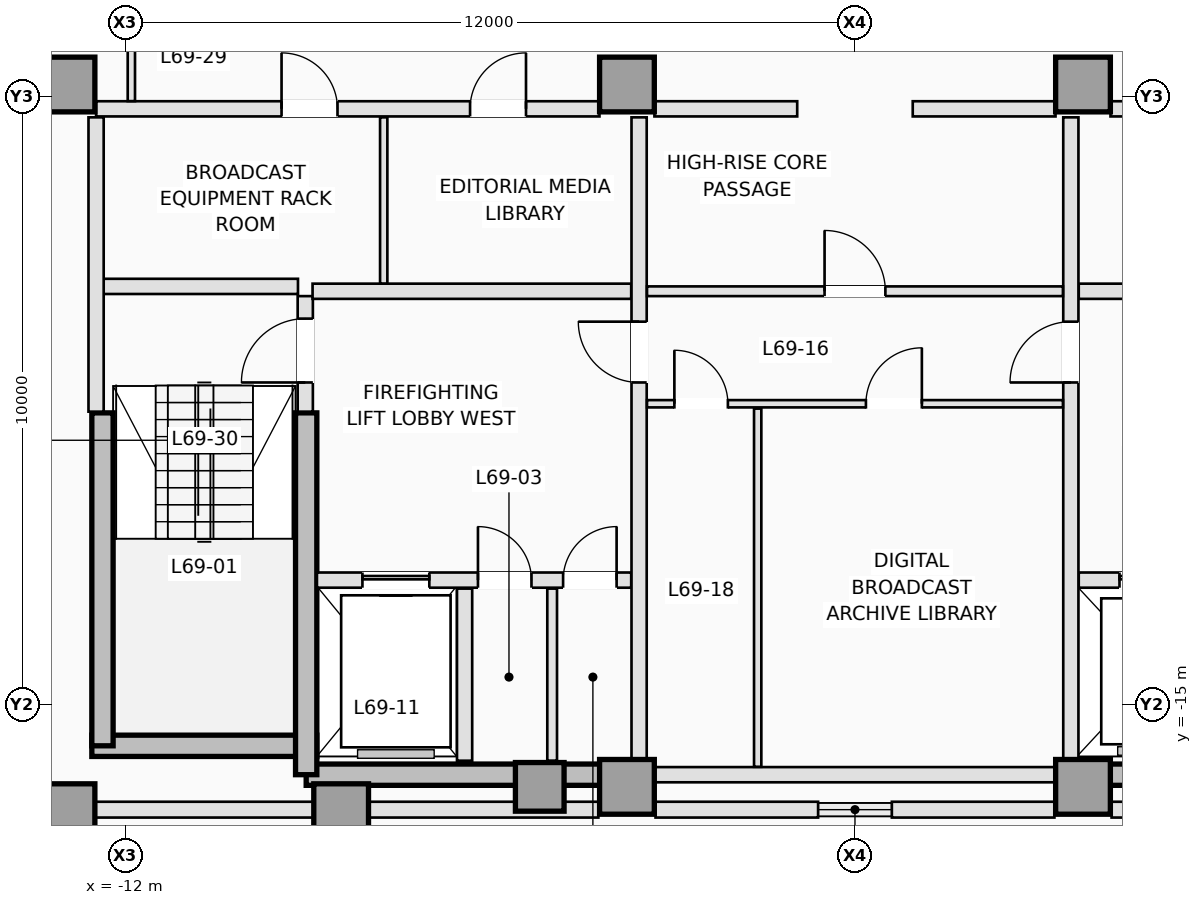
"""IFC4 building model, lengths in metres.
Left out: names, types, materials, properties, quantities, classifications, styles, units other than length and angle.
Written with IfcOpenShell. Run it as: python <this file> out.ifc"""

import sys

from ifc_helpers import new_model, si_unit, direction, frame, frame_2d, origin, origin_2d, place, context, subcontext, project, spatial, rectangle, extrude, element, fill, save


model = new_model("IFC4")
c1 = context("Model", 3, precision=1e-05, world=origin(), true_north=direction((0.0, 1.0)))
c2 = subcontext(c1, "Body", "Model", "MODEL_VIEW")
j1 = project(units=[si_unit("LENGTHUNIT", "METRE"), si_unit("PLANEANGLEUNIT", "RADIAN")], contexts=[c1])
p1 = place(None, origin())
s1 = spatial("IfcSite", under=j1, at=p1, CompositionType="ELEMENT")
p2 = place(p1, origin())
s2 = spatial("IfcBuilding", under=s1, at=p2, CompositionType="ELEMENT")
p3 = place(p2, frame((0.0, 0.0, 249.9)))
s3 = spatial("IfcBuildingStorey", under=s2, at=p3, CompositionType="ELEMENT", Elevation=249.9)
p4 = place(p3, frame((-12.55, -15.675, 0.0), z_axis=(0.0, 0.0, 1.0), x_axis=(1.0, 0.0, 0.0)))
e1 = element("IfcWall", 1, at=p4, inside=s3, PredefinedType="SHEAR", context=c2, shape_type="SweptSolid", body=[
    extrude(rectangle(XDim=3.7, YDim=0.35, at=frame_2d((1.85, 0.0))), origin(), (0.0, 0.0, 1.0), 3.5),
])
for number, where, z_axis, x_axis in (
    (2, (-9.025, -16.15, 0.0), (0.0, 0.0, 1.0), (1.0, 0.0, 0.0)),
    (3, (3.75, -16.15, 0.0), (0.0, 0.0, 1.0), (1.0, 0.0, 0.0)),
):
    element("IfcWall", number, at=place(p3, frame(where, z_axis=z_axis, x_axis=x_axis)), inside=s3, PredefinedType="SHEAR", context=c2, shape_type="SweptSolid", body=[
        extrude(rectangle(XDim=5.275, YDim=0.35, at=frame_2d((2.637, 0.0))), origin(), (0.0, 0.0, 1.0), 3.5),
    ])
p5 = place(p3, frame((-12.375, -15.675, 0.0), z_axis=(0.0, 0.0, 1.0), x_axis=(0.0, 1.0, 0.0)))
e4 = element("IfcWall", 4, at=p5, inside=s3, PredefinedType="SHEAR", context=c2, shape_type="SweptSolid", body=[
    extrude(rectangle(XDim=5.475, YDim=0.35, at=frame_2d((2.738, 0.0))), origin(), (0.0, 0.0, 1.0), 3.5),
])
p6 = place(p3, frame((-9.025, -16.15, 0.0), z_axis=(0.0, 0.0, 1.0), x_axis=(0.0, 1.0, 0.0)))
e5 = element("IfcWall", 5, at=p6, inside=s3, PredefinedType="SHEAR", context=c2, shape_type="SweptSolid", body=[
    extrude(rectangle(XDim=5.95, YDim=0.35, at=frame_2d((2.975, 0.0))), origin(), (0.0, 0.0, 1.0), 3.5),
])
for number, where, z_axis, x_axis in (
    (6, (-12.95, -16.75, 0.0), (0.0, 0.0, 1.0), (1.0, 0.0, 0.0)),
    (7, (-8.45, -16.75, 0.0), (0.0, 0.0, 1.0), (1.0, 0.0, 0.0)),
    (8, (-3.75, -16.35, 0.0), (0.0, 0.0, 1.0), (1.0, 0.0, 0.0)),
    (9, (3.75, -16.35, 0.0), (0.0, 0.0, 1.0), (1.0, 0.0, 0.0)),
    (10, (-12.95, -4.8, 0.0), (0.0, 0.0, 1.0), (1.0, 0.0, 0.0)),
    (11, (-3.75, -4.8, 0.0), (0.0, 0.0, 1.0), (1.0, 0.0, 0.0)),
    (12, (3.75, -4.8, 0.0), (0.0, 0.0, 1.0), (1.0, 0.0, 0.0)),
):
    element("IfcColumn", number, at=place(p3, frame(where, z_axis=z_axis, x_axis=x_axis)), inside=s3, PredefinedType="COLUMN", context=c2, shape_type="SweptSolid", body=[
        extrude(rectangle(XDim=0.9, YDim=0.9, at=origin_2d()), origin(), (0.0, 0.0, 1.0), 3.5),
    ])
p7 = place(p3, frame((-5.184, -16.35, 0.0), z_axis=(0.0, 0.0, 1.0), x_axis=(0.0, 1.0, 0.0)))
e13 = element("IfcColumn", 13, at=p7, inside=s3, PredefinedType="COLUMN", context=c2, shape_type="SweptSolid", body=[
    extrude(rectangle(XDim=0.8, YDim=0.8, at=origin_2d()), origin(), (0.0, 0.0, 1.0), 3.5),
])
for number, where, z_axis, x_axis in (
    (14, (15.493, -16.725, 0.0), (0.0, 0.0, 1.0), (-1.0, 0.0, 0.0)),
    (15, (-4.22, -16.725, 0.0), (0.0, 0.0, 1.0), (-1.0, 0.0, 0.0)),
):
    element("IfcWall", number, at=place(p3, frame(where, z_axis=z_axis, x_axis=x_axis)), inside=s3, PredefinedType="STANDARD", context=c2, shape_type="SweptSolid", body=[
        extrude(rectangle(XDim=11.273, YDim=0.26, at=frame_2d((5.636, 0.0))), origin(), (0.0, 0.0, 1.0), 2.79),
    ])
for number, where, z_axis, x_axis in (
    (16, (3.28, -16.725, 0.0), (0.0, 0.0, 1.0), (-1.0, 0.0, 0.0)),
    (17, (-0.606, -16.725, 0.0), (0.0, 0.0, 1.0), (-1.0, 0.0, 0.0)),
):
    element("IfcWall", number, at=place(p3, frame(where, z_axis=z_axis, x_axis=x_axis)), inside=s3, PredefinedType="STANDARD", context=c2, shape_type="SweptSolid", body=[
        extrude(rectangle(XDim=2.674, YDim=0.26, at=frame_2d((1.337, 0.0))), origin(), (0.0, 0.0, 1.0), 3.25),
    ])
p8 = place(p3, frame((-9.04, -10.18, 0.0), z_axis=(0.0, 0.0, 1.0), x_axis=(0.0, 1.0, 0.0)))
e18 = element("IfcWall", 18, at=p8, inside=s3, PredefinedType="PARTITIONING", context=c2, shape_type="SweptSolid", body=[
    extrude(rectangle(XDim=1.9, YDim=0.25, at=frame_2d((0.95, 0.0))), origin(), (0.0, 0.0, 1.0), 3.25),
])
p9 = place(p8, frame((0.48, 0.0, 0.0)))
e19 = element("IfcOpeningElement", 19, at=p9, cuts=e18, PredefinedType="OPENING", context=c2, shape_type="SweptSolid", body=[
    extrude(rectangle(XDim=1.05, YDim=2.15, at=frame_2d((0.525, 1.075))), frame((0.0, 0.135, 0.0), z_axis=(0.0, -1.0, 0.0), x_axis=(1.0, 0.0, 0.0)), (0.0, 0.0, 1.0), 0.27),
])
p10 = place(p3, frame((-12.38, -8.12, 0.0), z_axis=(0.0, 0.0, 1.0), x_axis=(1.0, 0.0, 0.0)))
e20 = element("IfcWall", 20, at=p10, inside=s3, PredefinedType="PARTITIONING", context=c2, shape_type="SweptSolid", body=[
    extrude(rectangle(XDim=3.22, YDim=0.25, at=frame_2d((1.61, 0.0))), origin(), (0.0, 0.0, 1.0), 3.25),
])
p11 = place(p3, frame((-12.48, -10.18, 0.0), z_axis=(0.0, 0.0, 1.0), x_axis=(0.0, 1.0, 0.0)))
e21 = element("IfcWall", 21, at=p11, inside=s3, PredefinedType="PARTITIONING", context=c2, shape_type="SweptSolid", body=[
    extrude(rectangle(XDim=4.84, YDim=0.25, at=frame_2d((2.42, 0.0))), origin(), (0.0, 0.0, 1.0), 3.25),
])
p12 = place(p3, frame((-8.848, -12.95, 0.0), z_axis=(0.0, 0.0, 1.0), x_axis=(1.0, 0.0, 0.0)))
e22 = element("IfcWall", 22, at=p12, inside=s3, PredefinedType="PARTITIONING", context=c2, shape_type="SweptSolid", body=[
    extrude(rectangle(XDim=5.168, YDim=0.25, at=frame_2d((2.584, 0.0))), origin(), (0.0, 0.0, 1.0), 3.25),
])
p13 = place(p12, frame((0.748, 0.0, 0.0)))
e23 = element("IfcOpeningElement", 23, at=p13, cuts=e22, PredefinedType="OPENING", context=c2, shape_type="SweptSolid", body=[
    extrude(rectangle(XDim=1.1, YDim=2.15, at=frame_2d((0.55, 1.075))), frame((0.0, 0.135, 0.0), z_axis=(0.0, -1.0, 0.0), x_axis=(1.0, 0.0, 0.0)), (0.0, 0.0, 1.0), 0.27),
])
p14 = place(p12, frame((2.648, 0.0, 0.0)))
e24 = element("IfcOpeningElement", 24, at=p14, cuts=e22, PredefinedType="OPENING", context=c2, shape_type="SweptSolid", body=[
    extrude(rectangle(XDim=0.88, YDim=2.1, at=frame_2d((0.44, 1.05))), frame((0.0, 0.135, 0.0), z_axis=(0.0, -1.0, 0.0), x_axis=(1.0, 0.0, 0.0)), (0.0, 0.0, 1.0), 0.27),
])
p15 = place(p12, frame((4.048, 0.0, 0.0)))
e25 = element("IfcOpeningElement", 25, at=p15, cuts=e22, PredefinedType="OPENING", context=c2, shape_type="SweptSolid", body=[
    extrude(rectangle(XDim=0.88, YDim=2.1, at=frame_2d((0.44, 1.05))), frame((0.0, 0.135, 0.0), z_axis=(0.0, -1.0, 0.0), x_axis=(1.0, 0.0, 0.0)), (0.0, 0.0, 1.0), 0.27),
])
p16 = place(p3, frame((3.68, -12.95, 0.0), z_axis=(0.0, 0.0, 1.0), x_axis=(1.0, 0.0, 0.0)))
e26 = element("IfcWall", 26, at=p16, inside=s3, PredefinedType="PARTITIONING", context=c2, shape_type="SweptSolid", body=[
    extrude(rectangle(XDim=5.168, YDim=0.25, at=frame_2d((2.584, 0.0))), origin(), (0.0, 0.0, 1.0), 3.25),
])
p17 = place(p16, frame((3.32, 0.0, 0.0)))
e27 = element("IfcOpeningElement", 27, at=p17, cuts=e26, PredefinedType="OPENING", context=c2, shape_type="SweptSolid", body=[
    extrude(rectangle(XDim=1.1, YDim=2.15, at=frame_2d((0.55, 1.075))), frame((0.0, 0.135, 0.0), z_axis=(0.0, -1.0, 0.0), x_axis=(1.0, 0.0, 0.0)), (0.0, 0.0, 1.0), 0.27),
])
p18 = place(p16, frame((0.67, 0.0, 0.0)))
e28 = element("IfcOpeningElement", 28, at=p18, cuts=e26, PredefinedType="OPENING", context=c2, shape_type="SweptSolid", body=[
    extrude(rectangle(XDim=1.2, YDim=2.15, at=frame_2d((0.6, 1.075))), frame((0.0, 0.135, 0.0), z_axis=(0.0, -1.0, 0.0), x_axis=(1.0, 0.0, 0.0)), (0.0, 0.0, 1.0), 0.27),
])
p19 = place(p3, frame((-6.42, -15.92, 0.0), z_axis=(0.0, 0.0, 1.0), x_axis=(0.0, 1.0, 0.0)))
e29 = element("IfcWall", 29, at=p19, inside=s3, PredefinedType="PARTITIONING", context=c2, shape_type="SweptSolid", body=[
    extrude(rectangle(XDim=2.83, YDim=0.25, at=frame_2d((1.415, 0.0))), origin(), (0.0, 0.0, 1.0), 3.25),
])
p20 = place(p3, frame((-4.98, -15.92, 0.0), z_axis=(0.0, 0.0, 1.0), x_axis=(0.0, 1.0, 0.0)))
e30 = element("IfcWall", 30, at=p20, inside=s3, PredefinedType="PARTITIONING", context=c2, shape_type="SweptSolid", body=[
    extrude(rectangle(XDim=2.83, YDim=0.16, at=frame_2d((1.415, 0.0))), origin(), (0.0, 0.0, 1.0), 3.25),
])
for number, where, z_axis, x_axis in (
    (31, (-8.92, -8.2, 0.0), (0.0, 0.0, 1.0), (1.0, 0.0, 0.0)),
    (32, (3.68, -8.2, 0.0), (0.0, 0.0, 1.0), (1.0, 0.0, 0.0)),
):
    element("IfcWall", number, at=place(p3, frame(where, z_axis=z_axis, x_axis=x_axis)), inside=s3, PredefinedType="PARTITIONING", context=c2, shape_type="SweptSolid", body=[
        extrude(rectangle(XDim=5.24, YDim=0.25, at=frame_2d((2.62, 0.0))), origin(), (0.0, 0.0, 1.0), 3.25),
    ])
p21 = place(p3, frame((-3.55, -15.898, 0.0), z_axis=(0.0, 0.0, 1.0), x_axis=(0.0, 1.0, 0.0)))
e33 = element("IfcWall", 33, at=p21, inside=s3, PredefinedType="PARTITIONING", context=c2, shape_type="SweptSolid", body=[
    extrude(rectangle(XDim=10.558, YDim=0.25, at=frame_2d((5.279, 0.0))), origin(), (0.0, 0.0, 1.0), 3.25),
])
p22 = place(p21, frame((6.198, 0.0, 0.0)))
e34 = element("IfcOpeningElement", 34, at=p22, cuts=e33, PredefinedType="OPENING", context=c2, shape_type="SweptSolid", body=[
    extrude(rectangle(XDim=1.0, YDim=2.15, at=frame_2d((0.5, 1.075))), frame((0.0, 0.135, 0.0), z_axis=(0.0, -1.0, 0.0), x_axis=(1.0, 0.0, 0.0)), (0.0, 0.0, 1.0), 0.27),
])
p23 = place(p3, frame((3.55, -15.898, 0.0), z_axis=(0.0, 0.0, 1.0), x_axis=(0.0, 1.0, 0.0)))
e35 = element("IfcWall", 35, at=p23, inside=s3, PredefinedType="PARTITIONING", context=c2, shape_type="SweptSolid", body=[
    extrude(rectangle(XDim=10.558, YDim=0.25, at=frame_2d((5.279, 0.0))), origin(), (0.0, 0.0, 1.0), 3.25),
])
p24 = place(p23, frame((6.198, 0.0, 0.0)))
e36 = element("IfcOpeningElement", 36, at=p24, cuts=e35, PredefinedType="OPENING", context=c2, shape_type="SweptSolid", body=[
    extrude(rectangle(XDim=1.0, YDim=2.15, at=frame_2d((0.5, 1.075))), frame((0.0, 0.135, 0.0), z_axis=(0.0, -1.0, 0.0), x_axis=(1.0, 0.0, 0.0)), (0.0, 0.0, 1.0), 0.27),
])
p25 = place(p3, frame((-12.48, -5.2, 0.0), z_axis=(0.0, 0.0, 1.0), x_axis=(1.0, 0.0, 0.0)))
e37 = element("IfcWall", 37, at=p25, inside=s3, PredefinedType="PARTITIONING", context=c2, shape_type="SweptSolid", body=[
    extrude(rectangle(XDim=8.278, YDim=0.25, at=frame_2d((4.139, 0.0))), origin(), (0.0, 0.0, 1.0), 3.25),
])
p26 = place(p25, frame((3.05, 0.0, 0.0)))
e38 = element("IfcOpeningElement", 38, at=p26, cuts=e37, PredefinedType="OPENING", context=c2, shape_type="SweptSolid", body=[
    extrude(rectangle(XDim=0.92, YDim=2.12, at=frame_2d((0.46, 1.06))), frame((0.0, 0.135, 0.0), z_axis=(0.0, -1.0, 0.0), x_axis=(1.0, 0.0, 0.0)), (0.0, 0.0, 1.0), 0.27),
])
p27 = place(p25, frame((6.15, 0.0, 0.0)))
e39 = element("IfcOpeningElement", 39, at=p27, cuts=e37, PredefinedType="OPENING", context=c2, shape_type="SweptSolid", body=[
    extrude(rectangle(XDim=0.92, YDim=2.12, at=frame_2d((0.46, 1.06))), frame((0.0, 0.135, 0.0), z_axis=(0.0, -1.0, 0.0), x_axis=(1.0, 0.0, 0.0)), (0.0, 0.0, 1.0), 0.27),
])
p28 = place(p3, frame((4.202, -5.2, 0.0), z_axis=(0.0, 0.0, 1.0), x_axis=(1.0, 0.0, 0.0)))
e40 = element("IfcWall", 40, at=p28, inside=s3, PredefinedType="PARTITIONING", context=c2, shape_type="SweptSolid", body=[
    extrude(rectangle(XDim=8.278, YDim=0.25, at=frame_2d((4.139, 0.0))), origin(), (0.0, 0.0, 1.0), 3.25),
])
p29 = place(p28, frame((0.748, 0.0, 0.0)))
e41 = element("IfcOpeningElement", 41, at=p29, cuts=e40, PredefinedType="OPENING", context=c2, shape_type="SweptSolid", body=[
    extrude(rectangle(XDim=1.0, YDim=2.15, at=frame_2d((0.5, 1.075))), frame((0.0, 0.135, 0.0), z_axis=(0.0, -1.0, 0.0), x_axis=(1.0, 0.0, 0.0)), (0.0, 0.0, 1.0), 0.27),
])
p30 = place(p28, frame((2.698, 0.0, 0.0)))
e42 = element("IfcOpeningElement", 42, at=p30, cuts=e40, PredefinedType="OPENING", context=c2, shape_type="SweptSolid", body=[
    extrude(rectangle(XDim=1.0, YDim=2.15, at=frame_2d((0.5, 1.075))), frame((0.0, 0.135, 0.0), z_axis=(0.0, -1.0, 0.0), x_axis=(1.0, 0.0, 0.0)), (0.0, 0.0, 1.0), 0.27),
])
p31 = place(p28, frame((4.648, 0.0, 0.0)))
e43 = element("IfcOpeningElement", 43, at=p31, cuts=e40, PredefinedType="OPENING", context=c2, shape_type="SweptSolid", body=[
    extrude(rectangle(XDim=1.0, YDim=2.15, at=frame_2d((0.5, 1.075))), frame((0.0, 0.135, 0.0), z_axis=(0.0, -1.0, 0.0), x_axis=(1.0, 0.0, 0.0)), (0.0, 0.0, 1.0), 0.27),
])
p32 = place(p28, frame((6.598, 0.0, 0.0)))
e44 = element("IfcOpeningElement", 44, at=p32, cuts=e40, PredefinedType="OPENING", context=c2, shape_type="SweptSolid", body=[
    extrude(rectangle(XDim=1.0, YDim=2.15, at=frame_2d((0.5, 1.075))), frame((0.0, 0.135, 0.0), z_axis=(0.0, -1.0, 0.0), x_axis=(1.0, 0.0, 0.0)), (0.0, 0.0, 1.0), 0.27),
])
for number, where, z_axis, x_axis in (
    (45, (-3.298, -5.2, 0.0), (0.0, 0.0, 1.0), (1.0, 0.0, 0.0)),
    (46, (0.95, -5.2, 0.0), (0.0, 0.0, 1.0), (1.0, 0.0, 0.0)),
):
    element("IfcWall", number, at=place(p3, frame(where, z_axis=z_axis, x_axis=x_axis)), inside=s3, PredefinedType="PARTITIONING", context=c2, shape_type="SweptSolid", body=[
        extrude(rectangle(XDim=2.348, YDim=0.25, at=frame_2d((1.174, 0.0))), origin(), (0.0, 0.0, 1.0), 3.25),
    ])
p33 = place(p3, frame((-7.75, -8.073, 0.0), z_axis=(0.0, 0.0, 1.0), x_axis=(0.0, 1.0, 0.0)))
e47 = element("IfcWall", 47, at=p33, inside=s3, PredefinedType="PARTITIONING", context=c2, shape_type="SweptSolid", body=[
    extrude(rectangle(XDim=2.733, YDim=0.12, at=frame_2d((1.366, 0.0))), origin(), (0.0, 0.0, 1.0), 3.25),
])
p34 = place(p3, frame((-3.298, -16.15, 0.0), z_axis=(0.0, 0.0, 1.0), x_axis=(1.0, 0.0, 0.0)))
e48 = element("IfcWall", 48, at=p34, inside=s3, PredefinedType="PARTITIONING", context=c2, shape_type="SweptSolid", body=[
    extrude(rectangle(XDim=6.596, YDim=0.25, at=frame_2d((3.298, 0.0))), origin(), (0.0, 0.0, 1.0), 2.844),
])
p35 = place(p3, frame((-3.42, -8.2, 0.0), z_axis=(0.0, 0.0, 1.0), x_axis=(1.0, 0.0, 0.0)))
e49 = element("IfcWall", 49, at=p35, inside=s3, PredefinedType="PARTITIONING", context=c2, shape_type="SweptSolid", body=[
    extrude(rectangle(XDim=6.84, YDim=0.16, at=frame_2d((3.42, 0.0))), origin(), (0.0, 0.0, 1.0), 3.25),
])
p36 = place(p35, frame((2.92, 0.0, 0.0)))
e50 = element("IfcOpeningElement", 50, at=p36, cuts=e49, PredefinedType="OPENING", context=c2, shape_type="SweptSolid", body=[
    extrude(rectangle(XDim=1.0, YDim=2.15, at=frame_2d((0.5, 1.075))), frame((0.0, 0.09, 0.0), z_axis=(0.0, -1.0, 0.0), x_axis=(1.0, 0.0, 0.0)), (0.0, 0.0, 1.0), 0.18),
])
p37 = place(p3, frame((-3.42, -10.05, 0.0), z_axis=(0.0, 0.0, 1.0), x_axis=(1.0, 0.0, 0.0)))
e51 = element("IfcWall", 51, at=p37, inside=s3, PredefinedType="PARTITIONING", context=c2, shape_type="SweptSolid", body=[
    extrude(rectangle(XDim=6.84, YDim=0.12, at=frame_2d((3.42, 0.0))), origin(), (0.0, 0.0, 1.0), 3.25),
])
p38 = place(p37, frame((0.45, 0.0, 0.0)))
e52 = element("IfcOpeningElement", 52, at=p38, cuts=e51, PredefinedType="OPENING", context=c2, shape_type="SweptSolid", body=[
    extrude(rectangle(XDim=0.88, YDim=2.12, at=frame_2d((0.44, 1.06))), frame((0.0, 0.07, 0.0), z_axis=(0.0, -1.0, 0.0), x_axis=(1.0, 0.0, 0.0)), (0.0, 0.0, 1.0), 0.14),
])
p39 = place(p37, frame((3.6, 0.0, 0.0)))
e53 = element("IfcOpeningElement", 53, at=p39, cuts=e51, PredefinedType="OPENING", context=c2, shape_type="SweptSolid", body=[
    extrude(rectangle(XDim=0.92, YDim=2.12, at=frame_2d((0.46, 1.06))), frame((0.0, 0.07, 0.0), z_axis=(0.0, -1.0, 0.0), x_axis=(1.0, 0.0, 0.0)), (0.0, 0.0, 1.0), 0.14),
])
p40 = place(p3, frame((-1.6, -16.02, 0.0), z_axis=(0.0, 0.0, 1.0), x_axis=(0.0, 1.0, 0.0)))
e54 = element("IfcWall", 54, at=p40, inside=s3, PredefinedType="PARTITIONING", context=c2, shape_type="SweptSolid", body=[
    extrude(rectangle(XDim=5.89, YDim=0.12, at=frame_2d((2.945, 0.0))), origin(), (0.0, 0.0, 1.0), 3.25),
])
p41 = place(p3, frame((-11.9, -5.073, 0.0), z_axis=(0.0, 0.0, 1.0), x_axis=(0.0, 1.0, 0.0)))
e55 = element("IfcWall", 55, at=p41, inside=s3, PredefinedType="PARTITIONING", context=c2, shape_type="SweptSolid", body=[
    extrude(rectangle(XDim=2.343, YDim=0.12, at=frame_2d((1.171, 0.0))), origin(), (0.0, 0.0, 1.0), 3.25),
])
p42 = place(p13, origin())
e56 = element("IfcDoor", 56, at=p42, inside=s3, OperationType="SLIDING_TO_LEFT", PredefinedType="DOOR", context=c2, shape_type="SweptSolid", body=[
    extrude(rectangle(XDim=1.1, YDim=2.15, at=frame_2d((0.55, 1.075))), frame((0.0, 0.025, 0.0), z_axis=(0.0, -1.0, 0.0), x_axis=(1.0, 0.0, 0.0)), (0.0, 0.0, 1.0), 0.05),
])
fill(e23, e56)
p43 = place(p18, origin())
e57 = element("IfcDoor", 57, at=p43, inside=s3, OperationType="SLIDING_TO_LEFT", PredefinedType="DOOR", context=c2, shape_type="SweptSolid", body=[
    extrude(rectangle(XDim=1.2, YDim=2.15, at=frame_2d((0.6, 1.075))), frame((0.0, 0.025, 0.0), z_axis=(0.0, -1.0, 0.0), x_axis=(1.0, 0.0, 0.0)), (0.0, 0.0, 1.0), 0.05),
])
fill(e28, e57)
p44 = place(p9, origin())
e58 = element("IfcDoor", 58, at=p44, inside=s3, OperationType="SINGLE_SWING_LEFT", PredefinedType="DOOR", context=c2, shape_type="SweptSolid", body=[
    extrude(rectangle(XDim=1.05, YDim=2.15, at=frame_2d((0.525, 1.075))), frame((0.0, 0.025, 0.0), z_axis=(0.0, -1.0, 0.0), x_axis=(1.0, 0.0, 0.0)), (0.0, 0.0, 1.0), 0.05),
])
fill(e19, e58)
p45 = place(p14, origin())
e59 = element("IfcDoor", 59, at=p45, inside=s3, OperationType="SINGLE_SWING_LEFT", PredefinedType="TRAPDOOR", context=c2, shape_type="SweptSolid", body=[
    extrude(rectangle(XDim=0.88, YDim=2.1, at=frame_2d((0.44, 1.05))), frame((0.0, 0.025, 0.0), z_axis=(0.0, -1.0, 0.0), x_axis=(1.0, 0.0, 0.0)), (0.0, 0.0, 1.0), 0.05),
])
fill(e24, e59)
p46 = place(p15, origin())
e60 = element("IfcDoor", 60, at=p46, inside=s3, OperationType="SINGLE_SWING_RIGHT", PredefinedType="TRAPDOOR", context=c2, shape_type="SweptSolid", body=[
    extrude(rectangle(XDim=0.88, YDim=2.1, at=frame_2d((0.44, 1.05))), frame((0.0, 0.025, 0.0), z_axis=(0.0, -1.0, 0.0), x_axis=(1.0, 0.0, 0.0)), (0.0, 0.0, 1.0), 0.05),
])
fill(e25, e60)
p47 = place(p22, origin())
e61 = element("IfcDoor", 61, at=p47, inside=s3, OperationType="SINGLE_SWING_RIGHT", PredefinedType="DOOR", context=c2, shape_type="SweptSolid", body=[
    extrude(rectangle(XDim=1.0, YDim=2.15, at=frame_2d((0.5, 1.075))), frame((0.0, 0.025, 0.0), z_axis=(0.0, -1.0, 0.0), x_axis=(1.0, 0.0, 0.0)), (0.0, 0.0, 1.0), 0.05),
])
fill(e34, e61)
p48 = place(p24, origin())
e62 = element("IfcDoor", 62, at=p48, inside=s3, OperationType="SINGLE_SWING_LEFT", PredefinedType="DOOR", context=c2, shape_type="SweptSolid", body=[
    extrude(rectangle(XDim=1.0, YDim=2.15, at=frame_2d((0.5, 1.075))), frame((0.0, 0.025, 0.0), z_axis=(0.0, -1.0, 0.0), x_axis=(1.0, 0.0, 0.0)), (0.0, 0.0, 1.0), 0.05),
])
fill(e36, e62)
p49 = place(p26, origin())
e63 = element("IfcDoor", 63, at=p49, inside=s3, OperationType="SINGLE_SWING_LEFT", PredefinedType="DOOR", context=c2, shape_type="SweptSolid", body=[
    extrude(rectangle(XDim=0.92, YDim=2.12, at=frame_2d((0.46, 1.06))), frame((0.0, 0.025, 0.0), z_axis=(0.0, -1.0, 0.0), x_axis=(1.0, 0.0, 0.0)), (0.0, 0.0, 1.0), 0.05),
])
fill(e38, e63)
p50 = place(p27, origin())
e64 = element("IfcDoor", 64, at=p50, inside=s3, OperationType="SINGLE_SWING_RIGHT", PredefinedType="DOOR", context=c2, shape_type="SweptSolid", body=[
    extrude(rectangle(XDim=0.92, YDim=2.12, at=frame_2d((0.46, 1.06))), frame((0.0, 0.025, 0.0), z_axis=(0.0, -1.0, 0.0), x_axis=(1.0, 0.0, 0.0)), (0.0, 0.0, 1.0), 0.05),
])
fill(e39, e64)
p51 = place(p36, origin())
e65 = element("IfcDoor", 65, at=p51, inside=s3, OperationType="SINGLE_SWING_LEFT", PredefinedType="DOOR", context=c2, shape_type="SweptSolid", body=[
    extrude(rectangle(XDim=1.0, YDim=2.15, at=frame_2d((0.5, 1.075))), frame((0.0, 0.025, 0.0), z_axis=(0.0, -1.0, 0.0), x_axis=(1.0, 0.0, 0.0)), (0.0, 0.0, 1.0), 0.05),
])
fill(e50, e65)
p52 = place(p38, origin())
e66 = element("IfcDoor", 66, at=p52, inside=s3, OperationType="SINGLE_SWING_LEFT", PredefinedType="DOOR", context=c2, shape_type="SweptSolid", body=[
    extrude(rectangle(XDim=0.88, YDim=2.12, at=frame_2d((0.44, 1.06))), frame((0.0, 0.025, 0.0), z_axis=(0.0, -1.0, 0.0), x_axis=(1.0, 0.0, 0.0)), (0.0, 0.0, 1.0), 0.05),
])
fill(e52, e66)
p53 = place(p39, origin())
e67 = element("IfcDoor", 67, at=p53, inside=s3, OperationType="SINGLE_SWING_RIGHT", PredefinedType="DOOR", context=c2, shape_type="SweptSolid", body=[
    extrude(rectangle(XDim=0.92, YDim=2.12, at=frame_2d((0.46, 1.06))), frame((0.0, 0.025, 0.0), z_axis=(0.0, -1.0, 0.0), x_axis=(1.0, 0.0, 0.0)), (0.0, 0.0, 1.0), 0.05),
])
fill(e53, e67)
save(model, sys.argv[1])
